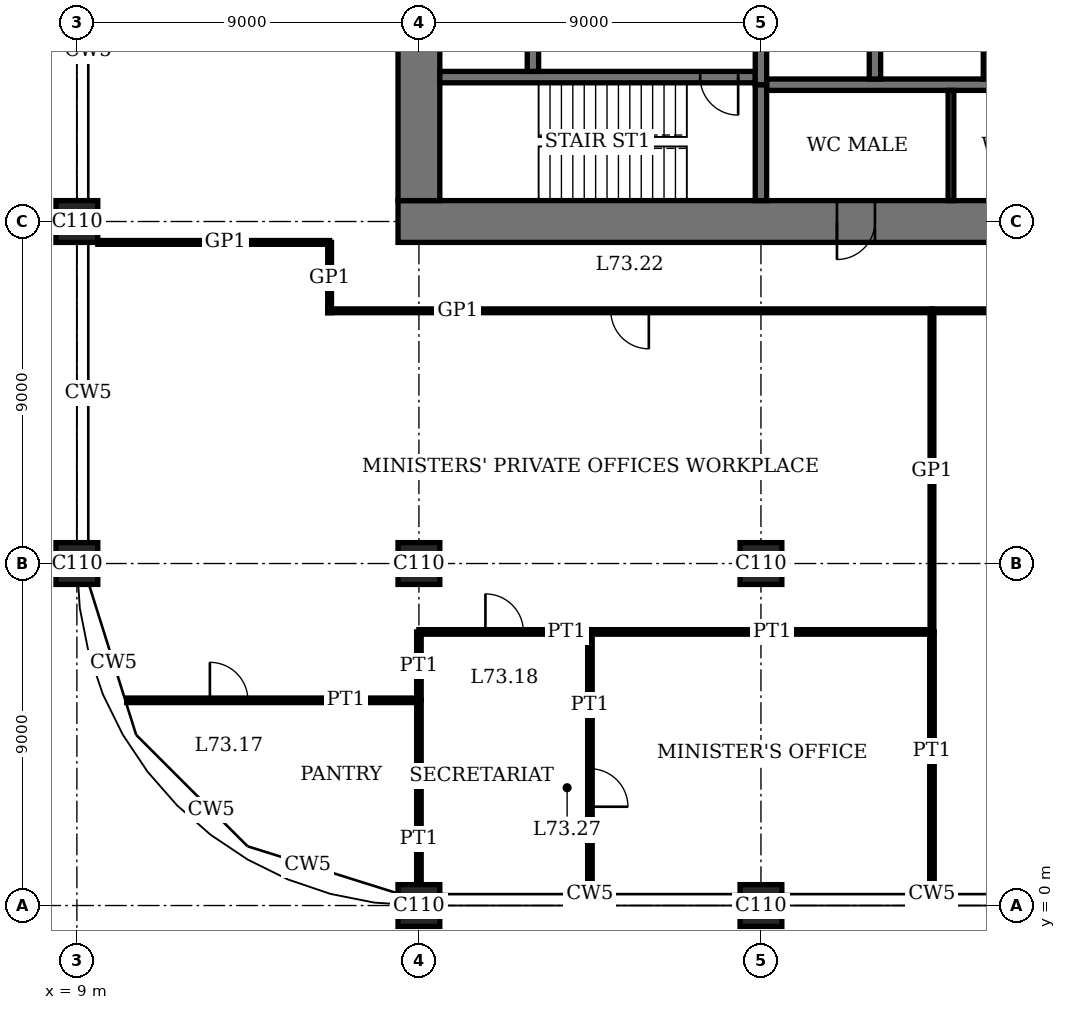
"""IFC4 building model, lengths in metres.
Left out: names, types, materials, properties, quantities, classifications, styles, units other than length and angle.
Written with IfcOpenShell. Run it as: python <this file> out.ifc"""

import sys

from ifc_helpers import new_model, si_unit, direction, frame, frame_2d, origin, origin_2d, place, context, subcontext, project, spatial, rectangle, extrude, element, fill, save


model = new_model("IFC4")
c1 = context("Model", 3, precision=1e-05, world=origin(), true_north=direction((0.0, 1.0)))
c2 = subcontext(c1, "Body", "Model", "MODEL_VIEW")
j1 = project(units=[si_unit("LENGTHUNIT", "METRE"), si_unit("PLANEANGLEUNIT", "RADIAN")], contexts=[c1])
p1 = place(None, origin())
s1 = spatial("IfcSite", under=j1, at=p1, CompositionType="ELEMENT")
p2 = place(p1, origin())
s2 = spatial("IfcBuilding", under=s1, at=p2, CompositionType="ELEMENT")
p3 = place(p2, frame((0.0, 0.0, 299.4)))
s3 = spatial("IfcBuildingStorey", under=s2, at=p3, CompositionType="ELEMENT", Elevation=299.4)
for number, where, z_axis, x_axis in (
    (1, (9.0, 9.0, 0.0), (0.0, 0.0, 1.0), (1.0, 0.0, 0.0)),
    (2, (9.0, 18.0, 0.0), (0.0, 0.0, 1.0), (1.0, 0.0, 0.0)),
    (3, (18.0, 0.0, 0.0), (0.0, 0.0, 1.0), (1.0, 0.0, 0.0)),
    (4, (18.0, 9.0, 0.0), (0.0, 0.0, 1.0), (1.0, 0.0, 0.0)),
    (5, (27.0, 0.0, 0.0), (0.0, 0.0, 1.0), (1.0, 0.0, 0.0)),
    (6, (27.0, 9.0, 0.0), (0.0, 0.0, 1.0), (1.0, 0.0, 0.0)),
):
    element("IfcColumn", number, at=place(p3, frame(where, z_axis=z_axis, x_axis=x_axis)), inside=s3, PredefinedType="COLUMN", context=c2, shape_type="SweptSolid", body=[
        extrude(rectangle(XDim=1.1, YDim=1.1, at=origin_2d()), origin(), (0.0, 0.0, 1.0), 4.0),
    ])
p4 = place(p3, frame((17.45, 18.0, 0.0), z_axis=(0.0, 0.0, 1.0), x_axis=(1.0, 0.0, 0.0)))
e7 = element("IfcWall", 7, at=p4, inside=s3, PredefinedType="SHEAR", context=c2, shape_type="SweptSolid", body=[
    extrude(rectangle(XDim=28.1, YDim=1.1, at=frame_2d((14.05, 0.0))), origin(), (0.0, 0.0, 1.0), 4.0),
])
p5 = place(p4, frame((11.55, 0.0, 0.0)))
e8 = element("IfcOpeningElement", 8, at=p5, cuts=e7, PredefinedType="OPENING", context=c2, shape_type="SweptSolid", body=[
    extrude(rectangle(XDim=1.0, YDim=2.4, at=frame_2d((0.5, 1.2))), frame((0.0, 0.56, 0.0), z_axis=(0.0, -1.0, 0.0), x_axis=(1.0, 0.0, 0.0)), (0.0, 0.0, 1.0), 1.12),
])
p6 = place(p4, frame((16.55, 0.0, 0.0)))
e9 = element("IfcOpeningElement", 9, at=p6, cuts=e7, PredefinedType="OPENING", context=c2, shape_type="SweptSolid", body=[
    extrude(rectangle(XDim=1.0, YDim=2.4, at=frame_2d((0.5, 1.2))), frame((0.0, 0.56, 0.0), z_axis=(0.0, -1.0, 0.0), x_axis=(1.0, 0.0, 0.0)), (0.0, 0.0, 1.0), 1.12),
])
p7 = place(p4, frame((20.0, 0.0, 0.0)))
e10 = element("IfcOpeningElement", 10, at=p7, cuts=e7, PredefinedType="OPENING", context=c2, shape_type="SweptSolid", body=[
    extrude(rectangle(XDim=1.1, YDim=2.4, at=frame_2d((0.55, 1.2))), frame((0.0, 0.56, 0.0), z_axis=(0.0, -1.0, 0.0), x_axis=(1.0, 0.0, 0.0)), (0.0, 0.0, 1.0), 1.12),
])
p8 = place(p4, frame((24.05, 0.0, 0.0)))
e11 = element("IfcOpeningElement", 11, at=p8, cuts=e7, PredefinedType="OPENING", context=c2, shape_type="SweptSolid", body=[
    extrude(rectangle(XDim=1.0, YDim=2.4, at=frame_2d((0.5, 1.2))), frame((0.0, 0.56, 0.0), z_axis=(0.0, -1.0, 0.0), x_axis=(1.0, 0.0, 0.0)), (0.0, 0.0, 1.0), 1.12),
])
p9 = place(p3, frame((18.0, 35.45, 0.0), z_axis=(0.0, 0.0, 1.0), x_axis=(0.0, -1.0, 0.0)))
e12 = element("IfcWall", 12, at=p9, inside=s3, PredefinedType="SHEAR", context=c2, shape_type="SweptSolid", body=[
    extrude(rectangle(XDim=16.9, YDim=1.1, at=frame_2d((8.45, 0.0))), origin(), (0.0, 0.0, 1.0), 4.0),
])
p10 = place(p9, frame((8.45, 0.0, 0.0)))
e13 = element("IfcOpeningElement", 13, at=p10, cuts=e12, PredefinedType="OPENING", context=c2, shape_type="SweptSolid", body=[
    extrude(rectangle(XDim=1.8, YDim=2.4, at=frame_2d((0.9, 1.2))), frame((0.0, 0.56, 0.0), z_axis=(0.0, -1.0, 0.0), x_axis=(1.0, 0.0, 0.0)), (0.0, 0.0, 1.0), 1.12),
])
p11 = place(p3, frame((18.55, 21.8, 0.0), z_axis=(0.0, 0.0, 1.0), x_axis=(1.0, 0.0, 0.0)))
e14 = element("IfcWall", 14, at=p11, inside=s3, PredefinedType="SHEAR", context=c2, shape_type="SweptSolid", body=[
    extrude(rectangle(XDim=8.3, YDim=0.3, at=frame_2d((4.15, 0.0))), origin(), (0.0, 0.0, 1.0), 4.0),
])
p12 = place(p11, frame((6.85, 0.0, 0.0)))
e15 = element("IfcOpeningElement", 15, at=p12, cuts=e14, PredefinedType="OPENING", context=c2, shape_type="SweptSolid", body=[
    extrude(rectangle(XDim=1.0, YDim=2.4, at=frame_2d((0.5, 1.2))), frame((0.0, 0.16, 0.0), z_axis=(0.0, -1.0, 0.0), x_axis=(1.0, 0.0, 0.0)), (0.0, 0.0, 1.0), 0.32),
])
p13 = place(p3, frame((27.0, 18.55, 0.0), z_axis=(0.0, 0.0, 1.0), x_axis=(0.0, 1.0, 0.0)))
e16 = element("IfcWall", 16, at=p13, inside=s3, PredefinedType="SHEAR", context=c2, shape_type="SweptSolid", body=[
    extrude(rectangle(XDim=3.05, YDim=0.3, at=frame_2d((1.525, 0.0))), origin(), (0.0, 0.0, 1.0), 4.0),
])
p14 = place(p3, frame((21.0, 21.95, 0.0), z_axis=(0.0, 0.0, 1.0), x_axis=(0.0, 1.0, 0.0)))
e17 = element("IfcWall", 17, at=p14, inside=s3, PredefinedType="SHEAR", context=c2, shape_type="SweptSolid", body=[
    extrude(rectangle(XDim=2.5, YDim=0.3, at=frame_2d((1.25, 0.0))), origin(), (0.0, 0.0, 1.0), 4.0),
])
p15 = place(p14, frame((0.7, 0.0, 0.0)))
e18 = element("IfcOpeningElement", 18, at=p15, cuts=e17, PredefinedType="OPENING", context=c2, shape_type="SweptSolid", body=[
    extrude(rectangle(XDim=1.1, YDim=2.4, at=frame_2d((0.55, 1.2))), frame((0.0, 0.16, 0.0), z_axis=(0.0, -1.0, 0.0), x_axis=(1.0, 0.0, 0.0)), (0.0, 0.0, 1.0), 0.32),
])
p16 = place(p3, frame((27.15, 21.6, 0.0), z_axis=(0.0, 0.0, 1.0), x_axis=(1.0, 0.0, 0.0)))
e19 = element("IfcWall", 19, at=p16, inside=s3, PredefinedType="SHEAR", context=c2, shape_type="SweptSolid", body=[
    extrude(rectangle(XDim=17.3, YDim=0.3, at=frame_2d((8.65, 0.0))), origin(), (0.0, 0.0, 1.0), 4.0),
])
for number, where, z_axis, x_axis in (
    (20, (30.0, 21.75, 0.0), (0.0, 0.0, 1.0), (0.0, 1.0, 0.0)),
    (21, (33.0, 21.75, 0.0), (0.0, 0.0, 1.0), (0.0, 1.0, 0.0)),
):
    element("IfcWall", number, at=place(p3, frame(where, z_axis=z_axis, x_axis=x_axis)), inside=s3, PredefinedType="SHEAR", context=c2, shape_type="SweptSolid", body=[
        extrude(rectangle(XDim=2.7, YDim=0.3, at=frame_2d((1.35, 0.0))), origin(), (0.0, 0.0, 1.0), 4.0),
    ])
p17 = place(p3, frame((27.0, 21.6, 0.0), z_axis=(0.0, 0.0, 1.0), x_axis=(0.0, 1.0, 0.0)))
e22 = element("IfcWall", 22, at=p17, inside=s3, PredefinedType="SHEAR", context=c2, shape_type="SweptSolid", body=[
    extrude(rectangle(XDim=2.85, YDim=0.3, at=frame_2d((1.425, 0.0))), origin(), (0.0, 0.0, 1.0), 4.0),
])
p18 = place(p3, frame((10.31, 5.4, 0.0), z_axis=(0.0, 0.0, 1.0), x_axis=(1.0, 0.0, 0.0)))
e23 = element("IfcWall", 23, at=p18, inside=s3, PredefinedType="PARTITIONING", context=c2, shape_type="SweptSolid", body=[
    extrude(rectangle(XDim=7.69, YDim=0.12, at=frame_2d((3.845, 0.0))), origin(), (0.0, 0.0, 1.0), 3.75),
])
p19 = place(p18, frame((2.19, 0.0, 0.0)))
e24 = element("IfcOpeningElement", 24, at=p19, cuts=e23, PredefinedType="OPENING", context=c2, shape_type="SweptSolid", body=[
    extrude(rectangle(XDim=1.0, YDim=2.4, at=frame_2d((0.5, 1.2))), frame((0.0, 0.07, 0.0), z_axis=(0.0, -1.0, 0.0), x_axis=(1.0, 0.0, 0.0)), (0.0, 0.0, 1.0), 0.14),
])
p20 = place(p3, frame((18.0, 7.2, 0.0), z_axis=(0.0, 0.0, 1.0), x_axis=(1.0, 0.0, 0.0)))
e25 = element("IfcWall", 25, at=p20, inside=s3, PredefinedType="PARTITIONING", context=c2, shape_type="SweptSolid", body=[
    extrude(rectangle(XDim=4.5, YDim=0.12, at=frame_2d((2.25, 0.0))), origin(), (0.0, 0.0, 1.0), 3.75),
])
p21 = place(p20, frame((1.75, 0.0, 0.0)))
e26 = element("IfcOpeningElement", 26, at=p21, cuts=e25, PredefinedType="OPENING", context=c2, shape_type="SweptSolid", body=[
    extrude(rectangle(XDim=1.0, YDim=2.4, at=frame_2d((0.5, 1.2))), frame((0.0, 0.07, 0.0), z_axis=(0.0, -1.0, 0.0), x_axis=(1.0, 0.0, 0.0)), (0.0, 0.0, 1.0), 0.14),
])
p22 = place(p3, frame((22.5, 7.2, 0.0), z_axis=(0.0, 0.0, 1.0), x_axis=(1.0, 0.0, 0.0)))
e27 = element("IfcWall", 27, at=p22, inside=s3, PredefinedType="PARTITIONING", context=c2, shape_type="SweptSolid", body=[
    extrude(rectangle(XDim=9.0, YDim=0.12, at=frame_2d((4.5, 0.0))), origin(), (0.0, 0.0, 1.0), 3.75),
])
p23 = place(p3, frame((15.6, 15.65, 0.0), z_axis=(0.0, 0.0, 1.0), x_axis=(1.0, 0.0, 0.0)))
e28 = element("IfcWall", 28, at=p23, inside=s3, PredefinedType="PARTITIONING", context=c2, shape_type="SweptSolid", body=[
    extrude(rectangle(XDim=15.9, YDim=0.1, at=frame_2d((7.95, 0.0))), origin(), (0.0, 0.0, 1.0), 3.75),
])
p24 = place(p23, frame((7.45, 0.0, 0.0)))
e29 = element("IfcOpeningElement", 29, at=p24, cuts=e28, PredefinedType="OPENING", context=c2, shape_type="SweptSolid", body=[
    extrude(rectangle(XDim=1.0, YDim=2.4, at=frame_2d((0.5, 1.2))), frame((0.0, 0.06, 0.0), z_axis=(0.0, -1.0, 0.0), x_axis=(1.0, 0.0, 0.0)), (0.0, 0.0, 1.0), 0.12),
])
p25 = place(p3, frame((31.5, 15.65, 0.0), z_axis=(0.0, 0.0, 1.0), x_axis=(1.0, 0.0, 0.0)))
e30 = element("IfcWall", 30, at=p25, inside=s3, PredefinedType="PARTITIONING", context=c2, shape_type="SweptSolid", body=[
    extrude(rectangle(XDim=4.49, YDim=0.1, at=frame_2d((2.245, 0.0))), origin(), (0.0, 0.0, 1.0), 3.75),
])
p26 = place(p3, frame((9.55, 17.45, 0.0), z_axis=(0.0, 0.0, 1.0), x_axis=(1.0, 0.0, 0.0)))
e31 = element("IfcWall", 31, at=p26, inside=s3, PredefinedType="PARTITIONING", context=c2, shape_type="SweptSolid", body=[
    extrude(rectangle(XDim=6.1, YDim=0.1, at=frame_2d((3.05, 0.0))), origin(), (0.0, 0.0, 1.0), 3.75),
])
p27 = place(p3, frame((15.65, 15.6, 0.0), z_axis=(0.0, 0.0, 1.0), x_axis=(0.0, 1.0, 0.0)))
e32 = element("IfcWall", 32, at=p27, inside=s3, PredefinedType="PARTITIONING", context=c2, shape_type="SweptSolid", body=[
    extrude(rectangle(XDim=1.85, YDim=0.1, at=frame_2d((0.925, 0.0))), origin(), (0.0, 0.0, 1.0), 3.75),
])
p28 = place(p3, frame((18.0, 0.55, 0.0), z_axis=(0.0, 0.0, 1.0), x_axis=(0.0, 1.0, 0.0)))
e33 = element("IfcWall", 33, at=p28, inside=s3, PredefinedType="PARTITIONING", context=c2, shape_type="SweptSolid", body=[
    extrude(rectangle(XDim=4.85, YDim=0.12, at=frame_2d((2.425, 0.0))), origin(), (0.0, 0.0, 1.0), 3.05),
])
p29 = place(p3, frame((18.0, 5.4, 0.0), z_axis=(0.0, 0.0, 1.0), x_axis=(0.0, 1.0, 0.0)))
e34 = element("IfcWall", 34, at=p29, inside=s3, PredefinedType="PARTITIONING", context=c2, shape_type="SweptSolid", body=[
    extrude(rectangle(XDim=1.8, YDim=0.12, at=frame_2d((0.9, 0.0))), origin(), (0.0, 0.0, 1.0), 3.05),
])
p30 = place(p3, frame((22.5, 0.31, 0.0), z_axis=(0.0, 0.0, 1.0), x_axis=(0.0, 1.0, 0.0)))
e35 = element("IfcWall", 35, at=p30, inside=s3, PredefinedType="PARTITIONING", context=c2, shape_type="SweptSolid", body=[
    extrude(rectangle(XDim=6.89, YDim=0.12, at=frame_2d((3.445, 0.0))), origin(), (0.0, 0.0, 1.0), 3.75),
])
p31 = place(p30, frame((2.29, 0.0, 0.0)))
e36 = element("IfcOpeningElement", 36, at=p31, cuts=e35, PredefinedType="OPENING", context=c2, shape_type="SweptSolid", body=[
    extrude(rectangle(XDim=1.0, YDim=2.4, at=frame_2d((0.5, 1.2))), frame((0.0, 0.07, 0.0), z_axis=(0.0, -1.0, 0.0), x_axis=(1.0, 0.0, 0.0)), (0.0, 0.0, 1.0), 0.14),
])
p32 = place(p3, frame((31.5, 0.31, 0.0), z_axis=(0.0, 0.0, 1.0), x_axis=(0.0, 1.0, 0.0)))
e37 = element("IfcWall", 37, at=p32, inside=s3, PredefinedType="PARTITIONING", context=c2, shape_type="SweptSolid", body=[
    extrude(rectangle(XDim=6.89, YDim=0.12, at=frame_2d((3.445, 0.0))), origin(), (0.0, 0.0, 1.0), 3.75),
])
p33 = place(p3, frame((31.5, 7.2, 0.0), z_axis=(0.0, 0.0, 1.0), x_axis=(0.0, 1.0, 0.0)))
e38 = element("IfcWall", 38, at=p33, inside=s3, PredefinedType="PARTITIONING", context=c2, shape_type="SweptSolid", body=[
    extrude(rectangle(XDim=8.45, YDim=0.1, at=frame_2d((4.225, 0.0))), origin(), (0.0, 0.0, 1.0), 3.75),
])
p34 = place(p3, frame((32.0, 18.55, 0.0), z_axis=(0.0, 0.0, 1.0), x_axis=(0.0, 1.0, 0.0)))
e39 = element("IfcWall", 39, at=p34, inside=s3, PredefinedType="PARTITIONING", context=c2, shape_type="SweptSolid", body=[
    extrude(rectangle(XDim=2.9, YDim=0.15, at=frame_2d((1.45, 0.0))), origin(), (0.0, 0.0, 1.0), 3.75),
])
p35 = place(p5, origin())
e40 = element("IfcDoor", 40, at=p35, inside=s3, OperationType="SINGLE_SWING_LEFT", PredefinedType="DOOR", context=c2, shape_type="SweptSolid", body=[
    extrude(rectangle(XDim=1.0, YDim=2.4, at=frame_2d((0.5, 1.2))), frame((0.0, 0.025, 0.0), z_axis=(0.0, -1.0, 0.0), x_axis=(1.0, 0.0, 0.0)), (0.0, 0.0, 1.0), 0.05),
    extrude(rectangle(XDim=0.04, YDim=2.4, at=frame_2d((0.02, 1.2))), frame((0.0, 0.4, 0.0), z_axis=(0.0, -1.0, 0.0), x_axis=(1.0, 0.0, 0.0)), (0.0, 0.0, 1.0), 0.8),
    extrude(rectangle(XDim=0.04, YDim=2.4, at=frame_2d((0.98, 1.2))), frame((0.0, 0.4, 0.0), z_axis=(0.0, -1.0, 0.0), x_axis=(1.0, 0.0, 0.0)), (0.0, 0.0, 1.0), 0.8),
    extrude(rectangle(XDim=1.0, YDim=0.04, at=frame_2d((0.5, 2.38))), frame((0.0, 0.4, 0.0), z_axis=(0.0, -1.0, 0.0), x_axis=(1.0, 0.0, 0.0)), (0.0, 0.0, 1.0), 0.8),
])
fill(e8, e40)
p36 = place(p12, origin())
e41 = element("IfcDoor", 41, at=p36, inside=s3, OperationType="SINGLE_SWING_RIGHT", PredefinedType="DOOR", context=c2, shape_type="SweptSolid", body=[
    extrude(rectangle(XDim=1.0, YDim=2.4, at=frame_2d((0.5, 1.2))), frame((0.0, 0.03, 0.0), z_axis=(0.0, -1.0, 0.0), x_axis=(1.0, 0.0, 0.0)), (0.0, 0.0, 1.0), 0.06),
])
fill(e15, e41)
p37 = place(p19, origin())
e42 = element("IfcDoor", 42, at=p37, inside=s3, OperationType="SINGLE_SWING_RIGHT", PredefinedType="DOOR", context=c2, shape_type="SweptSolid", body=[
    extrude(rectangle(XDim=1.0, YDim=2.4, at=frame_2d((0.5, 1.2))), frame((0.0, 0.025, 0.0), z_axis=(0.0, -1.0, 0.0), x_axis=(1.0, 0.0, 0.0)), (0.0, 0.0, 1.0), 0.05),
])
fill(e24, e42)
p38 = place(p21, origin())
e43 = element("IfcDoor", 43, at=p38, inside=s3, OperationType="SINGLE_SWING_RIGHT", PredefinedType="DOOR", context=c2, shape_type="SweptSolid", body=[
    extrude(rectangle(XDim=1.0, YDim=2.4, at=frame_2d((0.5, 1.2))), frame((0.0, 0.025, 0.0), z_axis=(0.0, -1.0, 0.0), x_axis=(1.0, 0.0, 0.0)), (0.0, 0.0, 1.0), 0.05),
])
fill(e26, e43)
p39 = place(p24, origin())
e44 = element("IfcDoor", 44, at=p39, inside=s3, OperationType="SINGLE_SWING_RIGHT", PredefinedType="DOOR", context=c2, shape_type="SweptSolid", body=[
    extrude(rectangle(XDim=1.0, YDim=2.4, at=frame_2d((0.5, 1.2))), frame((0.0, 0.02, 0.0), z_axis=(0.0, -1.0, 0.0), x_axis=(1.0, 0.0, 0.0)), (0.0, 0.0, 1.0), 0.04),
])
fill(e29, e44)
p40 = place(p31, origin())
e45 = element("IfcDoor", 45, at=p40, inside=s3, OperationType="SINGLE_SWING_LEFT", PredefinedType="DOOR", context=c2, shape_type="SweptSolid", body=[
    extrude(rectangle(XDim=1.0, YDim=2.4, at=frame_2d((0.5, 1.2))), frame((0.0, 0.025, 0.0), z_axis=(0.0, -1.0, 0.0), x_axis=(1.0, 0.0, 0.0)), (0.0, 0.0, 1.0), 0.05),
])
fill(e36, e45)
save(model, sys.argv[1])
